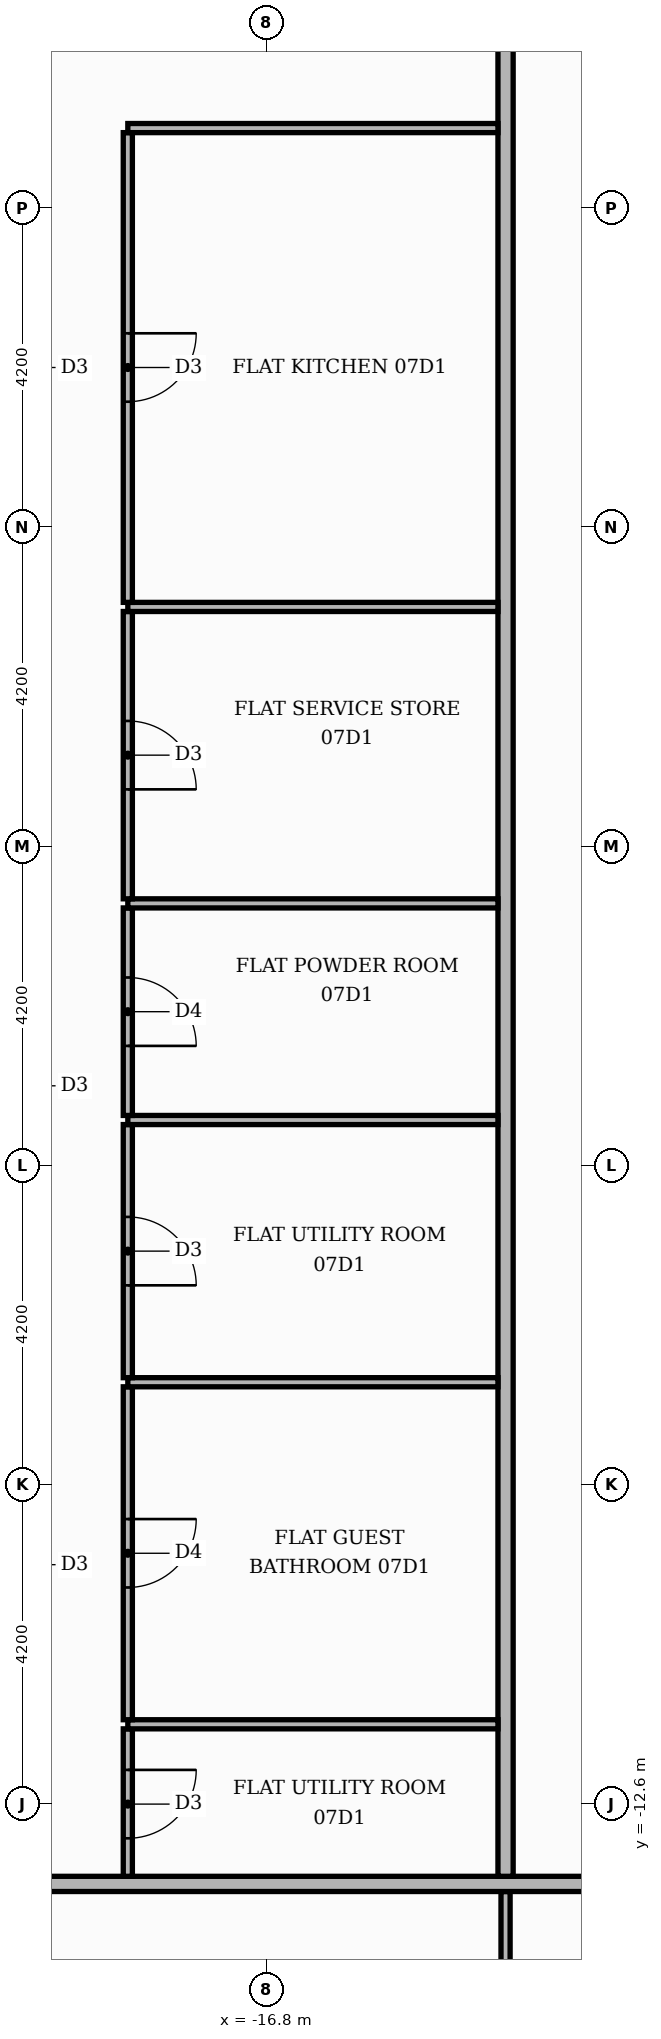
"""IFC4 building model, lengths in metres.
Left out: names, types, materials, properties, quantities, classifications, styles, units other than length and angle.
Written with IfcOpenShell. Run it as: python <this file> out.ifc"""

import sys

from ifc_helpers import new_model, si_unit, direction, frame, frame_2d, origin, place, context, subcontext, project, spatial, rectangle, extrude, element, fill, save


model = new_model("IFC4")
c1 = context("Model", 3, precision=1e-05, world=origin(), true_north=direction((0.0, 1.0)))
c2 = subcontext(c1, "Body", "Model", "MODEL_VIEW")
j1 = project(units=[si_unit("LENGTHUNIT", "METRE"), si_unit("PLANEANGLEUNIT", "RADIAN")], contexts=[c1])
p1 = place(None, origin())
s1 = spatial("IfcSite", under=j1, at=p1, CompositionType="ELEMENT")
p2 = place(p1, origin())
s2 = spatial("IfcBuilding", under=s1, at=p2, CompositionType="ELEMENT")
p3 = place(p2, frame((0.0, 0.0, 34.8)))
s3 = spatial("IfcBuildingStorey", under=s2, at=p3, CompositionType="ELEMENT", Elevation=34.8)
p4 = place(p3, frame((-13.65, -20.06, 0.0), z_axis=(0.0, 0.0, 1.0), x_axis=(0.0, 1.0, 0.0)))
e1 = element("IfcWall", 1, at=p4, inside=s3, PredefinedType="PARTITIONING", context=c2, shape_type="SweptSolid", body=[
    extrude(rectangle(XDim=6.31, YDim=0.12, at=frame_2d((3.155, 0.0))), origin(), (0.0, 0.0, 1.0), 3.48),
])
p5 = place(p4, frame((2.675, 0.0, 0.0)))
e2 = element("IfcOpeningElement", 2, at=p5, cuts=e1, PredefinedType="OPENING", context=c2, shape_type="SweptSolid", body=[
    extrude(rectangle(XDim=1.0, YDim=2.1, at=frame_2d((0.5, 1.05))), frame((0.0, 0.07, 0.0), z_axis=(0.0, -1.0, 0.0), x_axis=(1.0, 0.0, 0.0)), (0.0, 0.0, 1.0), 0.14),
])
p6 = place(p3, frame((-25.42, -13.65, 0.0), z_axis=(0.0, 0.0, 1.0), x_axis=(1.0, 0.0, 0.0)))
e3 = element("IfcWall", 3, at=p6, inside=s3, PredefinedType="PARTITIONING", context=c2, shape_type="SweptSolid", body=[
    extrude(rectangle(XDim=39.07, YDim=0.2, at=frame_2d((19.535, 0.0))), origin(), (0.0, 0.0, 1.0), 3.48),
])
p7 = place(p6, frame((14.37, 0.0, 0.0)))
e4 = element("IfcOpeningElement", 4, at=p7, cuts=e3, PredefinedType="OPENING", context=c2, shape_type="SweptSolid", body=[
    extrude(rectangle(XDim=1.1, YDim=2.4, at=frame_2d((0.55, 1.2))), frame((0.0, 0.11, 0.0), z_axis=(0.0, -1.0, 0.0), x_axis=(1.0, 0.0, 0.0)), (0.0, 0.0, 1.0), 0.22),
])
p8 = place(p3, frame((-18.62, -13.55, 0.0), z_axis=(0.0, 0.0, 1.0), x_axis=(0.0, 1.0, 0.0)))
e5 = element("IfcWall", 5, at=p8, inside=s3, PredefinedType="PARTITIONING", context=c2, shape_type="SweptSolid", body=[
    extrude(rectangle(XDim=1.94, YDim=0.12, at=frame_2d((0.97, 0.0))), origin(), (0.0, 0.0, 1.0), 3.48),
])
p9 = place(p8, frame((0.5, 0.0, 0.0)))
e6 = element("IfcOpeningElement", 6, at=p9, cuts=e5, PredefinedType="OPENING", context=c2, shape_type="SweptSolid", body=[
    extrude(rectangle(XDim=0.9, YDim=2.1, at=frame_2d((0.45, 1.05))), frame((0.0, 0.07, 0.0), z_axis=(0.0, -1.0, 0.0), x_axis=(1.0, 0.0, 0.0)), (0.0, 0.0, 1.0), 0.14),
])
p10 = place(p3, frame((-13.65, -13.55, 0.0), z_axis=(0.0, 0.0, 1.0), x_axis=(0.0, 1.0, 0.0)))
e7 = element("IfcWall", 7, at=p10, inside=s3, PredefinedType="PARTITIONING", context=c2, shape_type="SweptSolid", body=[
    extrude(rectangle(XDim=27.1, YDim=0.2, at=frame_2d((13.55, 0.0))), origin(), (0.0, 0.0, 1.0), 3.48),
])
p11 = place(p10, frame((24.55, 0.0, 0.0)))
e8 = element("IfcOpeningElement", 8, at=p11, cuts=e7, PredefinedType="OPENING", context=c2, shape_type="SweptSolid", body=[
    extrude(rectangle(XDim=1.1, YDim=2.4, at=frame_2d((0.55, 1.2))), frame((0.0, 0.11, 0.0), z_axis=(0.0, -1.0, 0.0), x_axis=(1.0, 0.0, 0.0)), (0.0, 0.0, 1.0), 0.22),
])
p12 = place(p3, frame((-18.62, -11.55, 0.0), z_axis=(0.0, 0.0, 1.0), x_axis=(1.0, 0.0, 0.0)))
e9 = element("IfcWall", 9, at=p12, inside=s3, PredefinedType="PARTITIONING", context=c2, shape_type="SweptSolid", body=[
    extrude(rectangle(XDim=4.87, YDim=0.12, at=frame_2d((2.435, 0.0))), origin(), (0.0, 0.0, 1.0), 3.48),
])
p13 = place(p3, frame((-18.62, -11.49, 0.0), z_axis=(0.0, 0.0, 1.0), x_axis=(0.0, 1.0, 0.0)))
e10 = element("IfcWall", 10, at=p13, inside=s3, PredefinedType="PARTITIONING", context=c2, shape_type="SweptSolid", body=[
    extrude(rectangle(XDim=4.38, YDim=0.12, at=frame_2d((2.19, 0.0))), origin(), (0.0, 0.0, 1.0), 3.48),
])
p14 = place(p13, frame((1.74, 0.0, 0.0)))
e11 = element("IfcOpeningElement", 11, at=p14, cuts=e10, PredefinedType="OPENING", context=c2, shape_type="SweptSolid", body=[
    extrude(rectangle(XDim=0.9, YDim=2.1, at=frame_2d((0.45, 1.05))), frame((0.0, 0.07, 0.0), z_axis=(0.0, -1.0, 0.0), x_axis=(1.0, 0.0, 0.0)), (0.0, 0.0, 1.0), 0.14),
])
p15 = place(p3, frame((-18.62, -7.05, 0.0), z_axis=(0.0, 0.0, 1.0), x_axis=(1.0, 0.0, 0.0)))
e12 = element("IfcWall", 12, at=p15, inside=s3, PredefinedType="PARTITIONING", context=c2, shape_type="SweptSolid", body=[
    extrude(rectangle(XDim=4.87, YDim=0.12, at=frame_2d((2.435, 0.0))), origin(), (0.0, 0.0, 1.0), 3.48),
])
p16 = place(p3, frame((-18.62, -6.99, 0.0), z_axis=(0.0, 0.0, 1.0), x_axis=(0.0, 1.0, 0.0)))
e13 = element("IfcWall", 13, at=p16, inside=s3, PredefinedType="PARTITIONING", context=c2, shape_type="SweptSolid", body=[
    extrude(rectangle(XDim=3.33, YDim=0.12, at=frame_2d((1.665, 0.0))), origin(), (0.0, 0.0, 1.0), 3.48),
])
p17 = place(p16, frame((1.215, 0.0, 0.0)))
e14 = element("IfcOpeningElement", 14, at=p17, cuts=e13, PredefinedType="OPENING", context=c2, shape_type="SweptSolid", body=[
    extrude(rectangle(XDim=0.9, YDim=2.1, at=frame_2d((0.45, 1.05))), frame((0.0, 0.07, 0.0), z_axis=(0.0, -1.0, 0.0), x_axis=(1.0, 0.0, 0.0)), (0.0, 0.0, 1.0), 0.14),
])
p18 = place(p3, frame((-18.62, -3.6, 0.0), z_axis=(0.0, 0.0, 1.0), x_axis=(1.0, 0.0, 0.0)))
e15 = element("IfcWall", 15, at=p18, inside=s3, PredefinedType="PARTITIONING", context=c2, shape_type="SweptSolid", body=[
    extrude(rectangle(XDim=4.87, YDim=0.12, at=frame_2d((2.435, 0.0))), origin(), (0.0, 0.0, 1.0), 3.48),
])
p19 = place(p3, frame((-18.62, -3.54, 0.0), z_axis=(0.0, 0.0, 1.0), x_axis=(0.0, 1.0, 0.0)))
e16 = element("IfcWall", 16, at=p19, inside=s3, PredefinedType="PARTITIONING", context=c2, shape_type="SweptSolid", body=[
    extrude(rectangle(XDim=2.73, YDim=0.12, at=frame_2d((1.365, 0.0))), origin(), (0.0, 0.0, 1.0), 3.48),
])
p20 = place(p19, frame((0.915, 0.0, 0.0)))
e17 = element("IfcOpeningElement", 17, at=p20, cuts=e16, PredefinedType="OPENING", context=c2, shape_type="SweptSolid", body=[
    extrude(rectangle(XDim=0.9, YDim=2.1, at=frame_2d((0.45, 1.05))), frame((0.0, 0.07, 0.0), z_axis=(0.0, -1.0, 0.0), x_axis=(1.0, 0.0, 0.0)), (0.0, 0.0, 1.0), 0.14),
])
p21 = place(p3, frame((-18.62, -0.75, 0.0), z_axis=(0.0, 0.0, 1.0), x_axis=(1.0, 0.0, 0.0)))
e18 = element("IfcWall", 18, at=p21, inside=s3, PredefinedType="PARTITIONING", context=c2, shape_type="SweptSolid", body=[
    extrude(rectangle(XDim=4.87, YDim=0.12, at=frame_2d((2.435, 0.0))), origin(), (0.0, 0.0, 1.0), 3.48),
])
p22 = place(p3, frame((-18.62, -0.69, 0.0), z_axis=(0.0, 0.0, 1.0), x_axis=(0.0, 1.0, 0.0)))
e19 = element("IfcWall", 19, at=p22, inside=s3, PredefinedType="PARTITIONING", context=c2, shape_type="SweptSolid", body=[
    extrude(rectangle(XDim=3.78, YDim=0.12, at=frame_2d((1.89, 0.0))), origin(), (0.0, 0.0, 1.0), 3.48),
])
p23 = place(p22, frame((1.44, 0.0, 0.0)))
e20 = element("IfcOpeningElement", 20, at=p23, cuts=e19, PredefinedType="OPENING", context=c2, shape_type="SweptSolid", body=[
    extrude(rectangle(XDim=0.9, YDim=2.1, at=frame_2d((0.45, 1.05))), frame((0.0, 0.07, 0.0), z_axis=(0.0, -1.0, 0.0), x_axis=(1.0, 0.0, 0.0)), (0.0, 0.0, 1.0), 0.14),
])
p24 = place(p3, frame((-18.62, 3.15, 0.0), z_axis=(0.0, 0.0, 1.0), x_axis=(1.0, 0.0, 0.0)))
e21 = element("IfcWall", 21, at=p24, inside=s3, PredefinedType="PARTITIONING", context=c2, shape_type="SweptSolid", body=[
    extrude(rectangle(XDim=4.87, YDim=0.12, at=frame_2d((2.435, 0.0))), origin(), (0.0, 0.0, 1.0), 3.48),
])
p25 = place(p3, frame((-18.62, 3.21, 0.0), z_axis=(0.0, 0.0, 1.0), x_axis=(0.0, 1.0, 0.0)))
e22 = element("IfcWall", 22, at=p25, inside=s3, PredefinedType="PARTITIONING", context=c2, shape_type="SweptSolid", body=[
    extrude(rectangle(XDim=6.18, YDim=0.12, at=frame_2d((3.09, 0.0))), origin(), (0.0, 0.0, 1.0), 3.48),
])
p26 = place(p25, frame((2.64, 0.0, 0.0)))
e23 = element("IfcOpeningElement", 23, at=p26, cuts=e22, PredefinedType="OPENING", context=c2, shape_type="SweptSolid", body=[
    extrude(rectangle(XDim=0.9, YDim=2.1, at=frame_2d((0.45, 1.05))), frame((0.0, 0.07, 0.0), z_axis=(0.0, -1.0, 0.0), x_axis=(1.0, 0.0, 0.0)), (0.0, 0.0, 1.0), 0.14),
])
p27 = place(p3, frame((-18.62, 9.45, 0.0), z_axis=(0.0, 0.0, 1.0), x_axis=(1.0, 0.0, 0.0)))
e24 = element("IfcWall", 24, at=p27, inside=s3, PredefinedType="PARTITIONING", context=c2, shape_type="SweptSolid", body=[
    extrude(rectangle(XDim=4.87, YDim=0.12, at=frame_2d((2.435, 0.0))), origin(), (0.0, 0.0, 1.0), 3.48),
])
p28 = place(p26, frame((0.9, 0.0, 0.0), z_axis=(0.0, 0.0, 1.0), x_axis=(-1.0, 0.0, 0.0)))
e25 = element("IfcDoor", 25, at=p28, inside=s3, OperationType="SINGLE_SWING_RIGHT", PredefinedType="DOOR", context=c2, shape_type="SweptSolid", body=[
    extrude(rectangle(XDim=0.9, YDim=2.1, at=frame_2d((0.45, 1.05))), frame((0.0, 0.025, 0.0), z_axis=(0.0, -1.0, 0.0), x_axis=(1.0, 0.0, 0.0)), (0.0, 0.0, 1.0), 0.05),
])
fill(e23, e25)
p29 = place(p23, frame((0.9, 0.0, 0.0), z_axis=(0.0, 0.0, 1.0), x_axis=(-1.0, 0.0, 0.0)))
e26 = element("IfcDoor", 26, at=p29, inside=s3, OperationType="SINGLE_SWING_LEFT", PredefinedType="DOOR", context=c2, shape_type="SweptSolid", body=[
    extrude(rectangle(XDim=0.9, YDim=2.1, at=frame_2d((0.45, 1.05))), frame((0.0, 0.025, 0.0), z_axis=(0.0, -1.0, 0.0), x_axis=(1.0, 0.0, 0.0)), (0.0, 0.0, 1.0), 0.05),
])
fill(e20, e26)
p30 = place(p20, frame((0.9, 0.0, 0.0), z_axis=(0.0, 0.0, 1.0), x_axis=(-1.0, 0.0, 0.0)))
e27 = element("IfcDoor", 27, at=p30, inside=s3, OperationType="SINGLE_SWING_LEFT", PredefinedType="DOOR", context=c2, shape_type="SweptSolid", body=[
    extrude(rectangle(XDim=0.9, YDim=2.1, at=frame_2d((0.45, 1.05))), frame((0.0, 0.025, 0.0), z_axis=(0.0, -1.0, 0.0), x_axis=(1.0, 0.0, 0.0)), (0.0, 0.0, 1.0), 0.05),
])
fill(e17, e27)
p31 = place(p17, frame((0.9, 0.0, 0.0), z_axis=(0.0, 0.0, 1.0), x_axis=(-1.0, 0.0, 0.0)))
e28 = element("IfcDoor", 28, at=p31, inside=s3, OperationType="SINGLE_SWING_LEFT", PredefinedType="DOOR", context=c2, shape_type="SweptSolid", body=[
    extrude(rectangle(XDim=0.9, YDim=2.1, at=frame_2d((0.45, 1.05))), frame((0.0, 0.025, 0.0), z_axis=(0.0, -1.0, 0.0), x_axis=(1.0, 0.0, 0.0)), (0.0, 0.0, 1.0), 0.05),
])
fill(e14, e28)
p32 = place(p14, frame((0.9, 0.0, 0.0), z_axis=(0.0, 0.0, 1.0), x_axis=(-1.0, 0.0, 0.0)))
e29 = element("IfcDoor", 29, at=p32, inside=s3, OperationType="SINGLE_SWING_RIGHT", PredefinedType="DOOR", context=c2, shape_type="SweptSolid", body=[
    extrude(rectangle(XDim=0.9, YDim=2.1, at=frame_2d((0.45, 1.05))), frame((0.0, 0.025, 0.0), z_axis=(0.0, -1.0, 0.0), x_axis=(1.0, 0.0, 0.0)), (0.0, 0.0, 1.0), 0.05),
])
fill(e11, e29)
p33 = place(p9, frame((0.9, 0.0, 0.0), z_axis=(0.0, 0.0, 1.0), x_axis=(-1.0, 0.0, 0.0)))
e30 = element("IfcDoor", 30, at=p33, inside=s3, OperationType="SINGLE_SWING_RIGHT", PredefinedType="DOOR", context=c2, shape_type="SweptSolid", body=[
    extrude(rectangle(XDim=0.9, YDim=2.1, at=frame_2d((0.45, 1.05))), frame((0.0, 0.025, 0.0), z_axis=(0.0, -1.0, 0.0), x_axis=(1.0, 0.0, 0.0)), (0.0, 0.0, 1.0), 0.05),
])
fill(e6, e30)
save(model, sys.argv[1])
